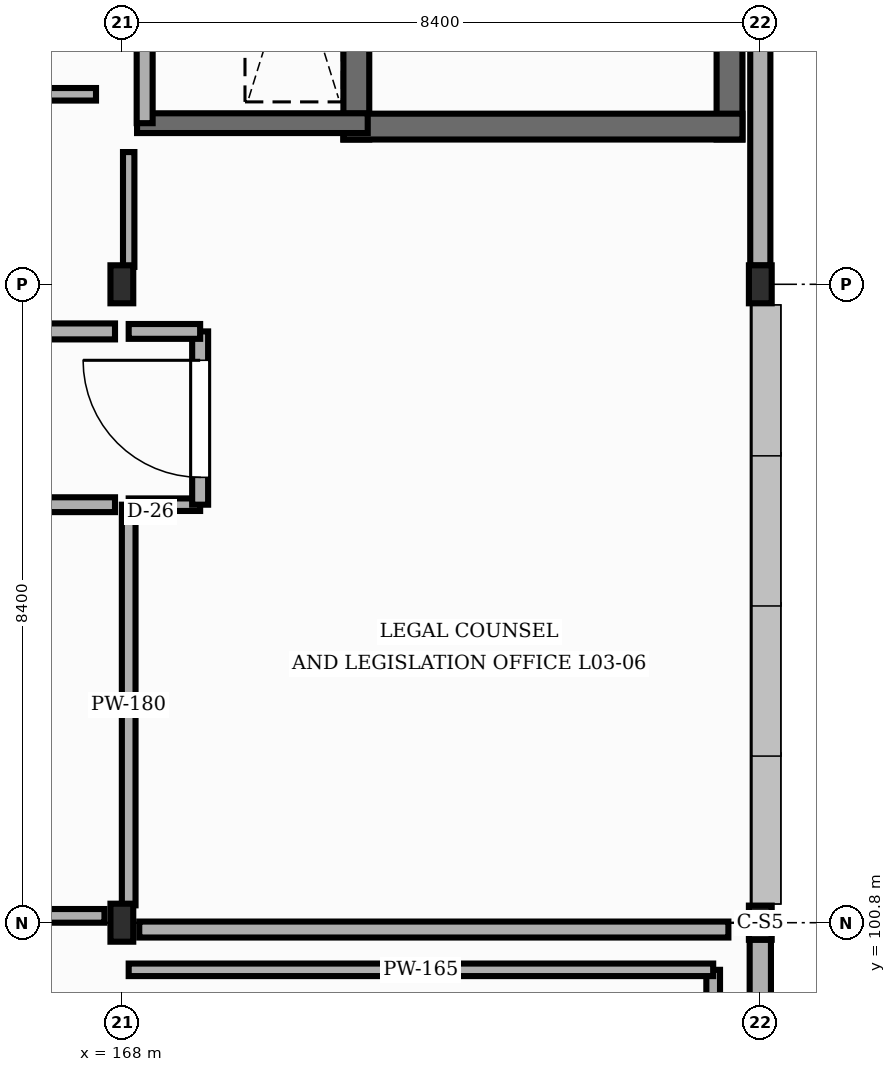
"""IFC4 building model, lengths in metres.
Left out: names, types, materials, properties, quantities, classifications, styles, units other than length and angle.
Written with IfcOpenShell. Run it as: python <this file> out.ifc"""

import sys

from ifc_helpers import new_model, si_unit, direction, frame, frame_2d, origin, origin_2d, place, context, subcontext, project, spatial, rectangle, i_section, extrude, element, fill, save


model = new_model("IFC4")
c1 = context("Model", 3, precision=1e-05, world=origin(), true_north=direction((0.0, 1.0)))
c2 = subcontext(c1, "Body", "Model", "MODEL_VIEW")
j1 = project(units=[si_unit("LENGTHUNIT", "METRE"), si_unit("PLANEANGLEUNIT", "RADIAN")], contexts=[c1])
p1 = place(None, origin())
s1 = spatial("IfcSite", under=j1, at=p1, CompositionType="ELEMENT")
p2 = place(p1, origin())
s2 = spatial("IfcBuilding", under=s1, at=p2, CompositionType="ELEMENT")
p3 = place(p2, frame((0.0, 0.0, 13.95)))
s3 = spatial("IfcBuildingStorey", under=s2, at=p3, CompositionType="ELEMENT", Elevation=13.95)
for number, where, z_axis, x_axis in (
    (1, (168.0, 100.8, 0.0), (0.0, 0.0, 1.0), (1.0, 0.0, 0.0)),
    (2, (168.0, 109.2, 0.0), (0.0, 0.0, 1.0), (1.0, 0.0, 0.0)),
):
    element("IfcColumn", number, at=place(p3, frame(where, z_axis=z_axis, x_axis=x_axis)), inside=s3, PredefinedType="COLUMN", context=c2, shape_type="SweptSolid", body=[
        extrude(i_section(OverallWidth=0.3, OverallDepth=0.5, WebThickness=0.014, FlangeThickness=0.028, FilletRadius=0.027, at=origin_2d()), origin(), (0.0, 0.0, 1.0), 4.05),
    ])
p4 = place(p3, frame((176.4, 100.8, 0.0), z_axis=(0.0, 0.0, 1.0), x_axis=(1.0, 0.0, 0.0)))
e3 = element("IfcColumn", 3, at=p4, inside=s3, PredefinedType="COLUMN", context=c2, shape_type="SweptSolid", body=[
    extrude(i_section(OverallWidth=0.3, OverallDepth=0.45, WebThickness=0.014, FlangeThickness=0.026, FilletRadius=0.027, at=origin_2d()), origin(), (0.0, 0.0, 1.0), 4.05),
])
p5 = place(p3, frame((176.4, 109.2, 0.0), z_axis=(0.0, 0.0, 1.0), x_axis=(1.0, 0.0, 0.0)))
e4 = element("IfcColumn", 4, at=p5, inside=s3, PredefinedType="COLUMN", context=c2, shape_type="SweptSolid", body=[
    extrude(i_section(OverallWidth=0.3, OverallDepth=0.5, WebThickness=0.014, FlangeThickness=0.028, FilletRadius=0.027, at=origin_2d()), origin(), (0.0, 0.0, 1.0), 4.05),
])
p6 = place(p3, frame((176.4, 92.596, 0.0), z_axis=(0.0, 0.0, 1.0), x_axis=(0.0, 1.0, 0.0)))
e5 = element("IfcWall", 5, at=p6, inside=s3, PredefinedType="STANDARD", context=c2, shape_type="SweptSolid", body=[
    extrude(rectangle(XDim=7.983, YDim=0.28, at=frame_2d((3.992, 0.0))), origin(), (0.0, 0.0, 1.0), 3.487),
])
p7 = place(p6, frame((0.85, 0.0, 0.9)))
e6 = element("IfcOpeningElement", 6, at=p7, cuts=e5, PredefinedType="OPENING", context=c2, shape_type="SweptSolid", body=[
    extrude(rectangle(XDim=1.12, YDim=1.25, at=frame_2d((0.56, 0.625))), frame((0.0, 0.15, 0.0), z_axis=(0.0, -1.0, 0.0), x_axis=(1.0, 0.0, 0.0)), (0.0, 0.0, 1.0), 0.3),
])
p8 = place(p6, frame((5.913, 0.0, 0.9)))
e7 = element("IfcOpeningElement", 7, at=p8, cuts=e5, PredefinedType="OPENING", context=c2, shape_type="SweptSolid", body=[
    extrude(rectangle(XDim=1.22, YDim=1.25, at=frame_2d((0.61, 0.625))), frame((0.0, 0.15, 0.0), z_axis=(0.0, -1.0, 0.0), x_axis=(1.0, 0.0, 0.0)), (0.0, 0.0, 1.0), 0.3),
])
p9 = place(p3, frame((176.4, 109.446, 0.0), z_axis=(0.0, 0.0, 1.0), x_axis=(0.0, 1.0, 0.0)))
e8 = element("IfcWall", 8, at=p9, inside=s3, PredefinedType="STANDARD", context=c2, shape_type="SweptSolid", body=[
    extrude(rectangle(XDim=7.908, YDim=0.265, at=frame_2d((3.954, 0.0))), origin(), (0.0, 0.0, 1.0), 3.487),
])
for number, where, z_axis, x_axis in (
    (9, (171.085, 111.105, 0.0), (0.0, 0.0, 1.0), (0.0, 1.0, 0.0)),
    (10, (175.995, 111.105, 0.0), (0.0, 0.0, 1.0), (0.0, 1.0, 0.0)),
):
    element("IfcWall", number, at=place(p3, frame(where, z_axis=z_axis, x_axis=x_axis)), inside=s3, PredefinedType="SHEAR", context=c2, shape_type="SweptSolid", body=[
        extrude(rectangle(XDim=9.74, YDim=0.34, at=frame_2d((4.87, 0.0))), origin(), (0.0, 0.0, 1.0), 3.85),
    ])
p10 = place(p3, frame((170.915, 111.275, 0.0), z_axis=(0.0, 0.0, 1.0), x_axis=(1.0, 0.0, 0.0)))
e11 = element("IfcWall", 11, at=p10, inside=s3, PredefinedType="SHEAR", context=c2, shape_type="SweptSolid", body=[
    extrude(rectangle(XDim=5.25, YDim=0.34, at=frame_2d((2.625, 0.0))), origin(), (0.0, 0.0, 1.0), 3.85),
])
p11 = place(p3, frame((168.2, 111.32, 0.0), z_axis=(0.0, 0.0, 1.0), x_axis=(1.0, 0.0, 0.0)))
e12 = element("IfcWall", 12, at=p11, inside=s3, PredefinedType="SHEAR", context=c2, shape_type="SweptSolid", body=[
    extrude(rectangle(XDim=3.035, YDim=0.26, at=frame_2d((1.518, 0.0))), origin(), (0.0, 0.0, 1.0), 3.85),
])
p12 = place(p3, frame((168.3, 111.32, 0.0), z_axis=(0.0, 0.0, 1.0), x_axis=(0.0, 1.0, 0.0)))
e13 = element("IfcWall", 13, at=p12, inside=s3, PredefinedType="STANDARD", context=c2, shape_type="SweptSolid", body=[
    extrude(rectangle(XDim=4.49, YDim=0.21, at=frame_2d((2.245, 0.0))), origin(), (0.0, 0.0, 1.0), 3.497),
])
p13 = place(p12, frame((1.6, 0.0, 0.0)))
e14 = element("IfcOpeningElement", 14, at=p13, cuts=e13, PredefinedType="OPENING", context=c2, shape_type="SweptSolid", body=[
    extrude(rectangle(XDim=0.9, YDim=2.1, at=frame_2d((0.45, 1.05))), frame((0.0, 0.115, 0.0), z_axis=(0.0, -1.0, 0.0), x_axis=(1.0, 0.0, 0.0)), (0.0, 0.0, 1.0), 0.23),
])
p14 = place(p3, frame((175.78, 97.9, -0.004), z_axis=(0.0, 0.0, 1.0), x_axis=(0.0, 1.0, 0.0)))
e15 = element("IfcWall", 15, at=p14, inside=s3, PredefinedType="STANDARD", context=c2, shape_type="SweptSolid", body=[
    extrude(rectangle(XDim=2.28, YDim=0.18, at=frame_2d((1.14, 0.0))), origin(), (0.0, 0.0, 1.0), 3.854),
])
p15 = place(p3, frame((175.78, 100.18, -0.004), z_axis=(0.0, 0.0, 1.0), x_axis=(-1.0, 0.0, 0.0)))
e16 = element("IfcWall", 16, at=p15, inside=s3, PredefinedType="STANDARD", context=c2, shape_type="SweptSolid", body=[
    extrude(rectangle(XDim=7.69, YDim=0.165, at=frame_2d((3.845, 0.0))), origin(), (0.0, 0.0, 1.0), 3.854),
])
p16 = place(p3, frame((168.229, 100.71, -0.004), z_axis=(0.0, 0.0, 1.0), x_axis=(1.0, 0.0, 0.0)))
e17 = element("IfcWall", 17, at=p16, inside=s3, PredefinedType="STANDARD", context=c2, shape_type="SweptSolid", body=[
    extrude(rectangle(XDim=7.751, YDim=0.21, at=frame_2d((3.875, 0.0))), origin(), (0.0, 0.0, 1.0), 3.251),
])
p17 = place(p3, frame((168.09, 101.029, -0.004), z_axis=(0.0, 0.0, 1.0), x_axis=(0.0, 1.0, 0.0)))
e18 = element("IfcWall", 18, at=p17, inside=s3, PredefinedType="STANDARD", context=c2, shape_type="SweptSolid", body=[
    extrude(rectangle(XDim=5.271, YDim=0.18, at=frame_2d((2.636, 0.0))), origin(), (0.0, 0.0, 1.0), 3.451),
])
p18 = place(p3, frame((168.09, 106.3, -0.004), z_axis=(0.0, 0.0, 1.0), x_axis=(1.0, 0.0, 0.0)))
e19 = element("IfcWall", 19, at=p18, inside=s3, PredefinedType="STANDARD", context=c2, shape_type="SweptSolid", body=[
    extrude(rectangle(XDim=0.94, YDim=0.165, at=frame_2d((0.47, 0.0))), origin(), (0.0, 0.0, 1.0), 3.854),
])
p19 = place(p3, frame((169.03, 106.3, -0.004), z_axis=(0.0, 0.0, 1.0), x_axis=(0.0, 1.0, 0.0)))
e20 = element("IfcWall", 20, at=p19, inside=s3, PredefinedType="STANDARD", context=c2, shape_type="SweptSolid", body=[
    extrude(rectangle(XDim=2.28, YDim=0.21, at=frame_2d((1.14, 0.0))), origin(), (0.0, 0.0, 1.0), 3.854),
])
p20 = place(p19, frame((0.36, 0.0, 0.0)))
e21 = element("IfcOpeningElement", 21, at=p20, cuts=e20, PredefinedType="OPENING", context=c2, shape_type="SweptSolid", body=[
    extrude(rectangle(XDim=1.54, YDim=2.22, at=frame_2d((0.77, 1.11))), frame((0.0, 0.115, 0.0), z_axis=(0.0, -1.0, 0.0), x_axis=(1.0, 0.0, 0.0)), (0.0, 0.0, 1.0), 0.23),
])
p21 = place(p3, frame((169.03, 108.58, -0.004), z_axis=(0.0, 0.0, 1.0), x_axis=(-1.0, 0.0, 0.0)))
e22 = element("IfcWall", 22, at=p21, inside=s3, PredefinedType="STANDARD", context=c2, shape_type="SweptSolid", body=[
    extrude(rectangle(XDim=0.94, YDim=0.195, at=frame_2d((0.47, 0.0))), origin(), (0.0, 0.0, 1.0), 3.854),
])
p22 = place(p3, frame((168.09, 109.429, -0.004), z_axis=(0.0, 0.0, 1.0), x_axis=(0.0, 1.0, 0.0)))
e23 = element("IfcWall", 23, at=p22, inside=s3, PredefinedType="STANDARD", context=c2, shape_type="SweptSolid", body=[
    extrude(rectangle(XDim=1.511, YDim=0.15, at=frame_2d((0.756, 0.0))), origin(), (0.0, 0.0, 1.0), 3.501),
])
p23 = place(p3, frame((165.1, 111.7, -0.004), z_axis=(0.0, 0.0, 1.0), x_axis=(1.0, 0.0, 0.0)))
e24 = element("IfcWall", 24, at=p23, inside=s3, PredefinedType="STANDARD", context=c2, shape_type="SweptSolid", body=[
    extrude(rectangle(XDim=2.56, YDim=0.165, at=frame_2d((1.28, 0.0))), origin(), (0.0, 0.0, 1.0), 3.854),
])
p24 = place(p3, frame((167.91, 108.58, -0.004), z_axis=(0.0, 0.0, 1.0), x_axis=(-1.0, 0.0, 0.0)))
e25 = element("IfcWall", 25, at=p24, inside=s3, PredefinedType="STANDARD", context=c2, shape_type="SweptSolid", body=[
    extrude(rectangle(XDim=5.41, YDim=0.21, at=frame_2d((2.705, 0.0))), origin(), (0.0, 0.0, 1.0), 3.854),
])
p25 = place(p3, frame((162.5, 106.3, -0.004), z_axis=(0.0, 0.0, 1.0), x_axis=(1.0, 0.0, 0.0)))
e26 = element("IfcWall", 26, at=p25, inside=s3, PredefinedType="STANDARD", context=c2, shape_type="SweptSolid", body=[
    extrude(rectangle(XDim=5.41, YDim=0.195, at=frame_2d((2.705, 0.0))), origin(), (0.0, 0.0, 1.0), 3.854),
])
p26 = place(p25, frame((0.762, 0.0, 0.0)))
e27 = element("IfcOpeningElement", 27, at=p26, cuts=e26, PredefinedType="OPENING", context=c2, shape_type="SweptSolid", body=[
    extrude(rectangle(XDim=1.18, YDim=2.14, at=frame_2d((0.59, 1.07))), frame((0.0, 0.107, 0.0), z_axis=(0.0, -1.0, 0.0), x_axis=(1.0, 0.0, 0.0)), (0.0, 0.0, 1.0), 0.215),
])
p27 = place(p3, frame((167.771, 100.89, -0.004), z_axis=(0.0, 0.0, 1.0), x_axis=(-1.0, 0.0, 0.0)))
e28 = element("IfcWall", 28, at=p27, inside=s3, PredefinedType="STANDARD", context=c2, shape_type="SweptSolid", body=[
    extrude(rectangle(XDim=5.271, YDim=0.18, at=frame_2d((2.636, 0.0))), origin(), (0.0, 0.0, 1.0), 3.506),
])
p28 = place(p20, origin())
e29 = element("IfcDoor", 29, at=p28, inside=s3, OperationType="SINGLE_SWING_RIGHT", PredefinedType="DOOR", context=c2, shape_type="SweptSolid", body=[
    extrude(rectangle(XDim=1.54, YDim=2.22, at=frame_2d((0.77, 1.11))), frame((0.0, 0.025, 0.0), z_axis=(0.0, -1.0, 0.0), x_axis=(1.0, 0.0, 0.0)), (0.0, 0.0, 1.0), 0.05),
])
fill(e21, e29)
save(model, sys.argv[1])
